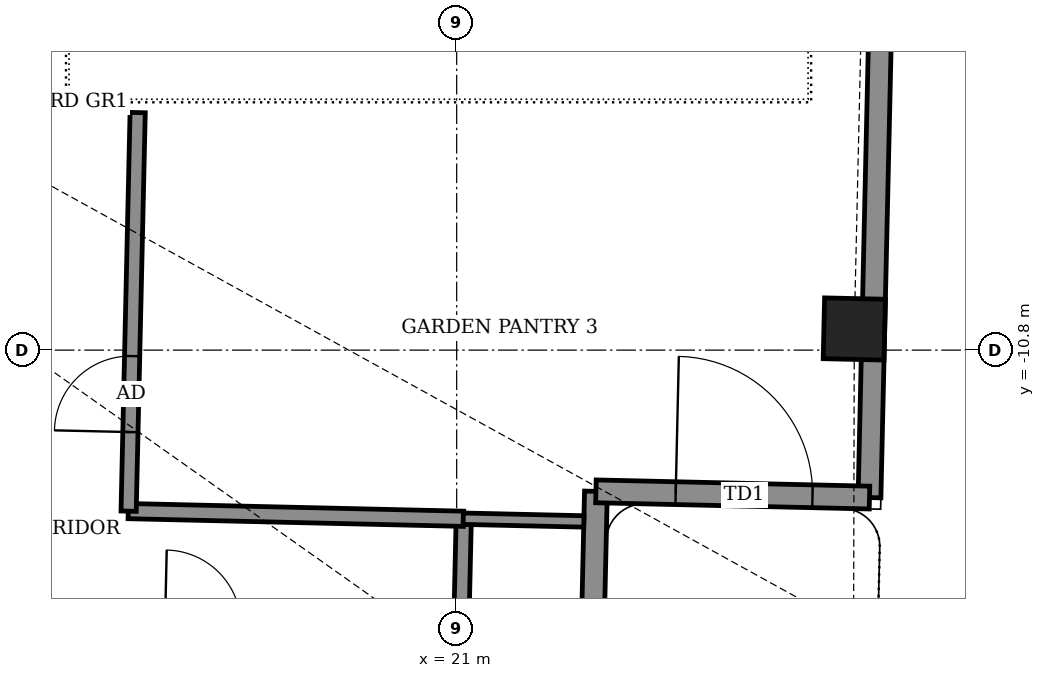
"""IFC4 building model, lengths in metres.
Left out: names, types, materials, properties, quantities, classifications, styles, units other than length and angle.
Written with IfcOpenShell. Run it as: python <this file> out.ifc"""

import sys

from ifc_helpers import new_model, si_unit, direction, frame, frame_2d, origin, origin_2d, place, context, subcontext, project, spatial, rectangle, extrude, element, fill, save


model = new_model("IFC4")
c1 = context("Model", 3, precision=1e-05, world=origin(), true_north=direction((0.0, 1.0)))
c2 = subcontext(c1, "Body", "Model", "MODEL_VIEW")
j1 = project(units=[si_unit("LENGTHUNIT", "METRE"), si_unit("PLANEANGLEUNIT", "RADIAN")], contexts=[c1])
p1 = place(None, origin())
s1 = spatial("IfcSite", under=j1, at=p1, CompositionType="ELEMENT")
p2 = place(p1, origin())
s2 = spatial("IfcBuilding", under=s1, at=p2, CompositionType="ELEMENT")
p3 = place(p2, frame((0.0, 0.0, 346.1)))
s3 = spatial("IfcBuildingStorey", under=s2, at=p3, CompositionType="ELEMENT", Elevation=346.1)
p4 = place(p3, frame((26.231, -10.522, -0.55), z_axis=(0.0, 0.0, 1.0), x_axis=(0.022736015698, 0.999741503385, 0.0)))
e1 = element("IfcColumn", 1, at=p4, inside=s3, PredefinedType="COLUMN", context=c2, shape_type="SweptSolid", body=[
    extrude(rectangle(XDim=0.8, YDim=0.8, at=origin_2d()), origin(), (0.0, 0.0, 1.0), 4.6),
])
p5 = place(p3, frame((26.431, -12.74, 0.0), z_axis=(0.0, 0.0, 1.0), x_axis=(0.022686338341, 0.999742631907, 0.0)))
e2 = element("IfcWall", 2, at=p5, inside=s3, PredefinedType="SOLIDWALL", context=c2, shape_type="SweptSolid", body=[
    extrude(rectangle(XDim=7.275, YDim=0.3, at=frame_2d((3.637, 0.0))), origin(), (0.0, 0.0, 1.0), 2.75),
])
p6 = place(p3, frame((22.75, -16.257, 0.0), z_axis=(0.0, 0.0, 1.0), x_axis=(0.02278610514, 0.999740363001, 0.0)))
e3 = element("IfcWall", 3, at=p6, inside=s3, PredefinedType="SOLIDWALL", context=c2, shape_type="SweptSolid", body=[
    extrude(rectangle(XDim=3.6, YDim=0.3, at=frame_2d((1.8, 0.0))), origin(), (0.0, 0.0, 1.0), 2.65),
])
p7 = place(p3, frame((22.832, -12.658, 0.0), z_axis=(0.0, 0.0, 1.0), x_axis=(0.999740327787, -0.022787650101, 0.0)))
e4 = element("IfcWall", 4, at=p7, inside=s3, PredefinedType="SOLIDWALL", context=c2, shape_type="SweptSolid", body=[
    extrude(rectangle(XDim=3.6, YDim=0.3, at=frame_2d((1.8, 0.0))), origin(), (0.0, 0.0, 1.0), 2.65),
])
p8 = place(p7, frame((1.05, 0.0, 0.0)))
e5 = element("IfcOpeningElement", 5, at=p8, cuts=e4, PredefinedType="OPENING", context=c2, shape_type="SweptSolid", body=[
    extrude(rectangle(XDim=1.8, YDim=2.4, at=frame_2d((0.9, 1.2))), frame((0.0, 0.16, 0.0), z_axis=(0.0, -1.0, 0.0), x_axis=(1.0, 0.0, 0.0)), (0.0, 0.0, 1.0), 0.32),
])
p9 = place(p3, frame((-19.351, -13.601, 0.0), z_axis=(0.0, 0.0, 1.0), x_axis=(0.999742592778, -0.02268806261, 0.0)))
e6 = element("IfcWall", 6, at=p9, inside=s3, PredefinedType="PARTITIONING", context=c2, shape_type="SweptSolid", body=[
    extrude(rectangle(XDim=40.417, YDim=0.2, at=frame_2d((20.209, 0.0))), origin(), (0.0, 0.0, 1.0), 2.85),
])
p10 = place(p9, frame((2.663, 0.0, 0.0)))
e7 = element("IfcOpeningElement", 7, at=p10, cuts=e6, PredefinedType="OPENING", context=c2, shape_type="SweptSolid", body=[
    extrude(rectangle(XDim=1.0, YDim=2.1, at=frame_2d((0.5, 1.05))), frame((0.0, 0.11, 0.0), z_axis=(0.0, -1.0, 0.0), x_axis=(1.0, 0.0, 0.0)), (0.0, 0.0, 1.0), 0.22),
])
p11 = place(p9, frame((11.296, 0.0, 0.0)))
e8 = element("IfcOpeningElement", 8, at=p11, cuts=e6, PredefinedType="OPENING", context=c2, shape_type="SweptSolid", body=[
    extrude(rectangle(XDim=1.0, YDim=2.1, at=frame_2d((0.5, 1.05))), frame((0.0, 0.11, 0.0), z_axis=(0.0, -1.0, 0.0), x_axis=(1.0, 0.0, 0.0)), (0.0, 0.0, 1.0), 0.22),
])
p12 = place(p9, frame((8.35, 0.0, 0.0)))
e9 = element("IfcOpeningElement", 9, at=p12, cuts=e6, PredefinedType="OPENING", context=c2, shape_type="SweptSolid", body=[
    extrude(rectangle(XDim=0.9, YDim=2.1, at=frame_2d((0.45, 1.05))), frame((0.0, 0.11, 0.0), z_axis=(0.0, -1.0, 0.0), x_axis=(1.0, 0.0, 0.0)), (0.0, 0.0, 1.0), 0.22),
])
p13 = place(p9, frame((17.319, 0.0, 0.0)))
e10 = element("IfcOpeningElement", 10, at=p13, cuts=e6, PredefinedType="OPENING", context=c2, shape_type="SweptSolid", body=[
    extrude(rectangle(XDim=1.0, YDim=2.1, at=frame_2d((0.5, 1.05))), frame((0.0, 0.11, 0.0), z_axis=(0.0, -1.0, 0.0), x_axis=(1.0, 0.0, 0.0)), (0.0, 0.0, 1.0), 0.22),
])
p14 = place(p9, frame((22.8, 0.0, 0.0)))
e11 = element("IfcOpeningElement", 11, at=p14, cuts=e6, PredefinedType="OPENING", context=c2, shape_type="SweptSolid", body=[
    extrude(rectangle(XDim=0.9, YDim=2.1, at=frame_2d((0.45, 1.05))), frame((0.0, 0.11, 0.0), z_axis=(0.0, -1.0, 0.0), x_axis=(1.0, 0.0, 0.0)), (0.0, 0.0, 1.0), 0.22),
])
p15 = place(p9, frame((27.8, 0.0, 0.0)))
e12 = element("IfcOpeningElement", 12, at=p15, cuts=e6, PredefinedType="OPENING", context=c2, shape_type="SweptSolid", body=[
    extrude(rectangle(XDim=1.0, YDim=2.1, at=frame_2d((0.5, 1.05))), frame((0.0, 0.11, 0.0), z_axis=(0.0, -1.0, 0.0), x_axis=(1.0, 0.0, 0.0)), (0.0, 0.0, 1.0), 0.22),
])
p16 = place(p9, frame((25.2, 0.0, 0.0)))
e13 = element("IfcOpeningElement", 13, at=p16, cuts=e6, PredefinedType="OPENING", context=c2, shape_type="SweptSolid", body=[
    extrude(rectangle(XDim=0.9, YDim=2.1, at=frame_2d((0.45, 1.05))), frame((0.0, 0.11, 0.0), z_axis=(0.0, -1.0, 0.0), x_axis=(1.0, 0.0, 0.0)), (0.0, 0.0, 1.0), 0.22),
])
p17 = place(p9, frame((31.45, 0.0, 0.0)))
e14 = element("IfcOpeningElement", 14, at=p17, cuts=e6, PredefinedType="OPENING", context=c2, shape_type="SweptSolid", body=[
    extrude(rectangle(XDim=1.0, YDim=2.1, at=frame_2d((0.5, 1.05))), frame((0.0, 0.11, 0.0), z_axis=(0.0, -1.0, 0.0), x_axis=(1.0, 0.0, 0.0)), (0.0, 0.0, 1.0), 0.22),
])
p18 = place(p9, frame((33.65, 0.0, 0.0)))
e15 = element("IfcOpeningElement", 15, at=p18, cuts=e6, PredefinedType="OPENING", context=c2, shape_type="SweptSolid", body=[
    extrude(rectangle(XDim=0.9, YDim=2.1, at=frame_2d((0.45, 1.05))), frame((0.0, 0.11, 0.0), z_axis=(0.0, -1.0, 0.0), x_axis=(1.0, 0.0, 0.0)), (0.0, 0.0, 1.0), 0.22),
])
p19 = place(p9, frame((36.523, 0.0, 0.0)))
e16 = element("IfcOpeningElement", 16, at=p19, cuts=e6, PredefinedType="OPENING", context=c2, shape_type="SweptSolid", body=[
    extrude(rectangle(XDim=1.0, YDim=2.1, at=frame_2d((0.5, 1.05))), frame((0.0, 0.11, 0.0), z_axis=(0.0, -1.0, 0.0), x_axis=(1.0, 0.0, 0.0)), (0.0, 0.0, 1.0), 0.22),
])
p20 = place(p3, frame((21.059, -14.518, 0.0), z_axis=(0.0, 0.0, 1.0), x_axis=(0.022632637625, 0.99974384905, 0.0)))
e17 = element("IfcWall", 17, at=p20, inside=s3, PredefinedType="PARTITIONING", context=c2, shape_type="SweptSolid", body=[
    extrude(rectangle(XDim=1.5, YDim=0.2, at=frame_2d((0.75, 0.0))), origin(), (0.0, 0.0, 1.0), 2.85),
])
p21 = place(p3, frame((16.679, -12.918, 0.0), z_axis=(0.0, 0.0, 1.0), x_axis=(0.999737590501, -0.022907425419, 0.0)))
e18 = element("IfcWall", 18, at=p21, inside=s3, PredefinedType="PARTITIONING", context=c2, shape_type="SweptSolid", body=[
    extrude(rectangle(XDim=4.412, YDim=0.2, at=frame_2d((2.206, 0.0))), origin(), (0.0, 0.0, 1.0), 2.85),
])
p22 = place(p3, frame((16.684, -12.919, 0.0), z_axis=(0.0, 0.0, 1.0), x_axis=(0.022667483124, 0.999743059595, 0.0)))
e19 = element("IfcWall", 19, at=p22, inside=s3, PredefinedType="PARTITIONING", context=c2, shape_type="SweptSolid", body=[
    extrude(rectangle(XDim=5.245, YDim=0.2, at=frame_2d((2.623, 0.0))), origin(), (0.0, 0.0, 1.0), 2.65),
])
p23 = place(p22, frame((1.041, 0.0, 0.0)))
e20 = element("IfcOpeningElement", 20, at=p23, cuts=e19, PredefinedType="OPENING", context=c2, shape_type="SweptSolid", body=[
    extrude(rectangle(XDim=1.0, YDim=2.1, at=frame_2d((0.5, 1.05))), frame((0.0, 0.11, 0.0), z_axis=(0.0, -1.0, 0.0), x_axis=(1.0, 0.0, 0.0)), (0.0, 0.0, 1.0), 0.22),
])
p24 = place(p3, frame((21.086, -13.018, 0.0), z_axis=(0.0, 0.0, 1.0), x_axis=(0.99974444885, -0.022606127362, 0.0)))
e21 = element("IfcWall", 21, at=p24, inside=s3, PredefinedType="PARTITIONING", context=c2, shape_type="SweptSolid", body=[
    extrude(rectangle(XDim=1.588, YDim=0.15, at=frame_2d((0.794, 0.0))), origin(), (0.0, 0.0, 1.0), 2.65),
])
p25 = place(p8, origin())
e22 = element("IfcDoor", 22, at=p25, inside=s3, OperationType="DOUBLE_DOOR_SINGLE_SWING", PredefinedType="DOOR", context=c2, shape_type="SweptSolid", body=[
    extrude(rectangle(XDim=1.8, YDim=2.4, at=frame_2d((0.9, 1.2))), frame((0.0, 0.025, 0.0), z_axis=(0.0, -1.0, 0.0), x_axis=(1.0, 0.0, 0.0)), (0.0, 0.0, 1.0), 0.05),
])
fill(e5, e22)
p26 = place(p23, origin())
e23 = element("IfcDoor", 23, at=p26, inside=s3, OperationType="SINGLE_SWING_LEFT", PredefinedType="DOOR", context=c2, shape_type="SweptSolid", body=[
    extrude(rectangle(XDim=1.0, YDim=2.1, at=frame_2d((0.5, 1.05))), frame((0.0, 0.025, 0.0), z_axis=(0.0, -1.0, 0.0), x_axis=(1.0, 0.0, 0.0)), (0.0, 0.0, 1.0), 0.05),
])
fill(e20, e23)
save(model, sys.argv[1])
